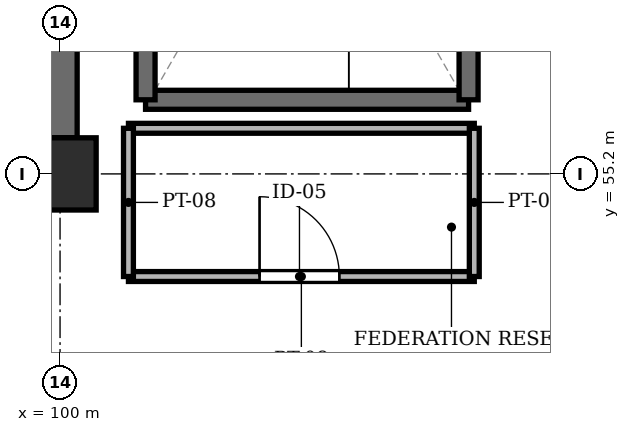
"""IFC4 building model, lengths in metres.
Left out: names, types, materials, properties, quantities, classifications, styles, units other than length and angle.
Written with IfcOpenShell. Run it as: python <this file> out.ifc"""

import sys

from ifc_helpers import new_model, si_unit, direction, frame, frame_2d, origin, origin_2d, place, context, subcontext, project, spatial, rectangle, extrude, element, fill, save


model = new_model("IFC4")
c1 = context("Model", 3, precision=1e-05, world=origin(), true_north=direction((0.0, 1.0)))
c2 = subcontext(c1, "Body", "Model", "MODEL_VIEW")
j1 = project(units=[si_unit("LENGTHUNIT", "METRE"), si_unit("PLANEANGLEUNIT", "RADIAN")], contexts=[c1])
p1 = place(None, origin())
s1 = spatial("IfcSite", under=j1, at=p1, CompositionType="ELEMENT")
p2 = place(p1, origin())
s2 = spatial("IfcBuilding", under=s1, at=p2, CompositionType="ELEMENT")
p3 = place(p2, frame((0.0, 0.0, 37.3)))
s3 = spatial("IfcBuildingStorey", under=s2, at=p3, CompositionType="ELEMENT", Elevation=37.3)
p4 = place(p3, frame((100.0, 55.2, -0.25), z_axis=(0.0, 0.0, 1.0), x_axis=(1.0, 0.0, 0.0)))
e1 = element("IfcColumn", 1, at=p4, inside=s3, PredefinedType="COLUMN", context=c2, shape_type="SweptSolid", body=[
    extrude(rectangle(XDim=0.95, YDim=0.95, at=origin_2d()), origin(), (0.0, 0.0, 1.0), 3.26),
])
p5 = place(p3, frame((100.0, 55.675, 0.0), z_axis=(0.0, 0.0, 1.0), x_axis=(0.0, 1.0, 0.0)))
e2 = element("IfcWall", 2, at=p5, inside=s3, PredefinedType="SHEAR", context=c2, shape_type="SweptSolid", body=[
    extrude(rectangle(XDim=6.325, YDim=0.45, at=frame_2d((3.163, 0.0))), origin(), (0.0, 0.0, 1.0), 3.01),
])
p6 = place(p3, frame((101.125, 56.175, 0.0), z_axis=(0.0, 0.0, 1.0), x_axis=(1.0, 0.0, 0.0)))
e3 = element("IfcWall", 3, at=p6, inside=s3, PredefinedType="SHEAR", context=c2, shape_type="SweptSolid", body=[
    extrude(rectangle(XDim=4.25, YDim=0.25, at=frame_2d((2.125, 0.0))), origin(), (0.0, 0.0, 1.0), 3.01),
])
for number, where, z_axis, x_axis in (
    (4, (101.125, 63.375, 0.0), (0.0, 0.0, 1.0), (0.0, -1.0, 0.0)),
    (5, (105.375, 56.175, 0.0), (0.0, 0.0, 1.0), (0.0, 1.0, 0.0)),
):
    element("IfcWall", number, at=place(p3, frame(where, z_axis=z_axis, x_axis=x_axis)), inside=s3, PredefinedType="SHEAR", context=c2, shape_type="SweptSolid", body=[
        extrude(rectangle(XDim=7.2, YDim=0.25, at=frame_2d((3.6, 0.0))), origin(), (0.0, 0.0, 1.0), 3.01),
    ])
p7 = place(p3, frame((100.9, 53.85, 0.0), z_axis=(0.0, 0.0, 1.0), x_axis=(1.0, 0.0, 0.0)))
e6 = element("IfcWall", 6, at=p7, inside=s3, PredefinedType="PARTITIONING", context=c2, shape_type="SweptSolid", body=[
    extrude(rectangle(XDim=4.55, YDim=0.13, at=frame_2d((2.275, 0.0))), origin(), (0.0, 0.0, 1.0), 2.53),
])
p8 = place(p7, frame((1.725, 0.0, 0.0)))
e7 = element("IfcOpeningElement", 7, at=p8, cuts=e6, PredefinedType="OPENING", context=c2, shape_type="SweptSolid", body=[
    extrude(rectangle(XDim=1.05, YDim=2.15, at=frame_2d((0.525, 1.075))), frame((0.0, 0.077, 0.0), z_axis=(0.0, -1.0, 0.0), x_axis=(1.0, 0.0, 0.0)), (0.0, 0.0, 1.0), 0.154),
])
p9 = place(p3, frame((100.9, 55.8, 0.0), z_axis=(0.0, 0.0, 1.0), x_axis=(1.0, 0.0, 0.0)))
e8 = element("IfcWall", 8, at=p9, inside=s3, PredefinedType="PARTITIONING", context=c2, shape_type="SweptSolid", body=[
    extrude(rectangle(XDim=4.55, YDim=0.13, at=frame_2d((2.275, 0.0))), origin(), (0.0, 0.0, 1.0), 2.53),
])
for number, where, z_axis, x_axis in (
    (9, (100.9, 53.85, 0.0), (0.0, 0.0, 1.0), (0.0, 1.0, 0.0)),
    (10, (105.45, 53.85, 0.0), (0.0, 0.0, 1.0), (0.0, 1.0, 0.0)),
):
    element("IfcWall", number, at=place(p3, frame(where, z_axis=z_axis, x_axis=x_axis)), inside=s3, PredefinedType="PARTITIONING", context=c2, shape_type="SweptSolid", body=[
        extrude(rectangle(XDim=1.95, YDim=0.13, at=frame_2d((0.975, 0.0))), origin(), (0.0, 0.0, 1.0), 2.53),
    ])
p10 = place(p8, origin())
e11 = element("IfcDoor", 11, at=p10, inside=s3, OperationType="SINGLE_SWING_LEFT", PredefinedType="DOOR", context=c2, shape_type="SweptSolid", body=[
    extrude(rectangle(XDim=1.05, YDim=2.15, at=frame_2d((0.525, 1.075))), frame((0.0, 0.025, 0.0), z_axis=(0.0, -1.0, 0.0), x_axis=(1.0, 0.0, 0.0)), (0.0, 0.0, 1.0), 0.05),
])
fill(e7, e11)
save(model, sys.argv[1])
